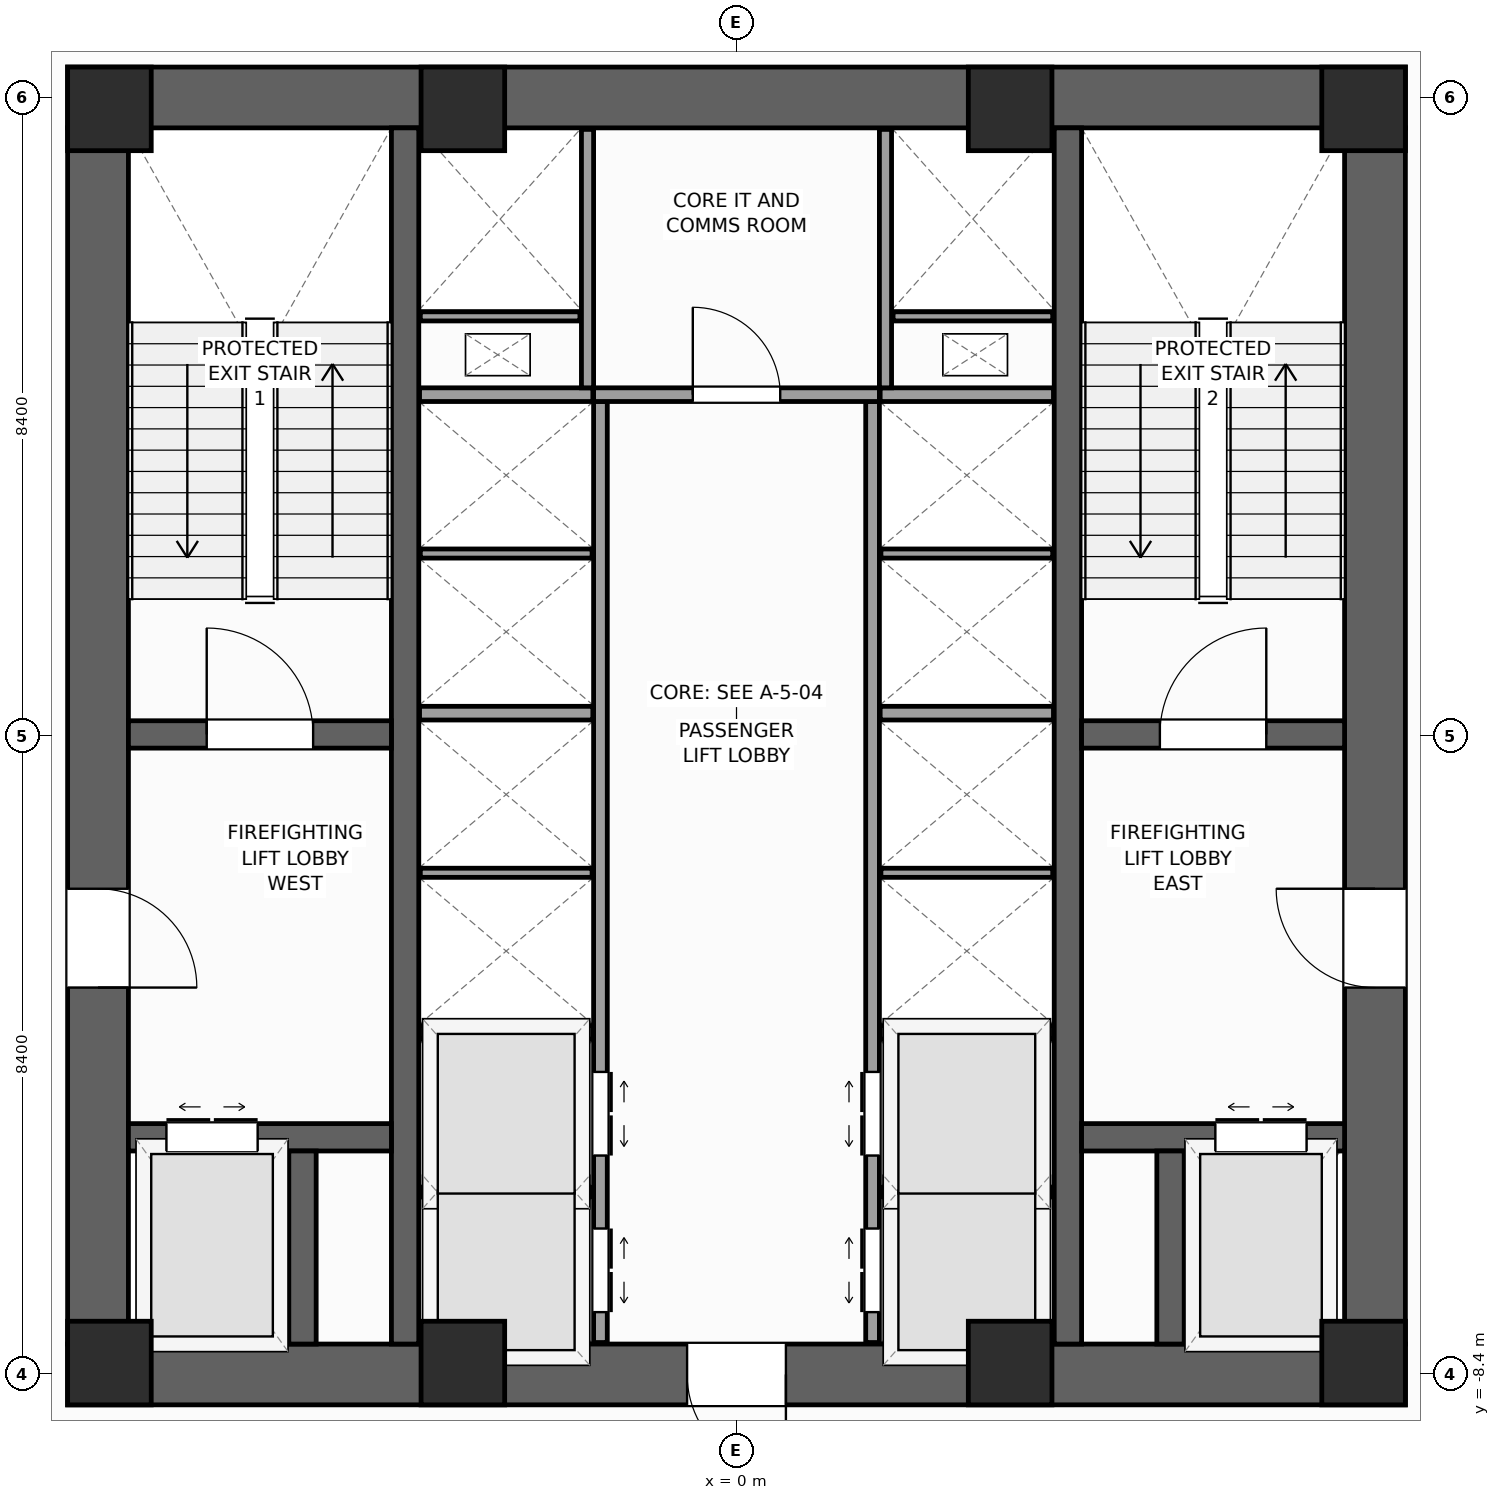
"""IFC4 building model, lengths in metres.
Left out: names, types, materials, properties, quantities, classifications, styles, units other than length and angle.
Written with IfcOpenShell. Run it as: python <this file> out.ifc"""

import sys

from ifc_helpers import new_model, si_unit, direction, frame, frame_2d, origin, origin_2d, place, context, subcontext, project, spatial, rectangle, extrude, source, transform, mapped, element, fill, save


model = new_model("IFC4")
c1 = context("Model", 3, precision=1e-05, world=origin(), true_north=direction((0.0, 1.0)))
c2 = subcontext(c1, "Body", "Model", "MODEL_VIEW")
j1 = project(units=[si_unit("LENGTHUNIT", "METRE"), si_unit("PLANEANGLEUNIT", "RADIAN")], contexts=[c1])
p1 = place(None, origin())
s1 = spatial("IfcSite", under=j1, at=p1, CompositionType="ELEMENT")
p2 = place(p1, origin())
s2 = spatial("IfcBuilding", under=s1, at=p2, CompositionType="ELEMENT")
p3 = place(p2, frame((0.0, 0.0, 21.0)))
s3 = spatial("IfcBuildingStorey", under=s2, at=p3, CompositionType="ELEMENT", Elevation=21.0)
p4 = place(p3, frame((-8.8, -8.4, 0.0), z_axis=(0.0, 0.0, 1.0), x_axis=(1.0, 0.0, 0.0)))
e1 = element("IfcWall", 1, at=p4, inside=s3, PredefinedType="SHEAR", context=c2, shape_type="SweptSolid", body=[
    extrude(rectangle(XDim=17.6, YDim=0.8, at=frame_2d((8.8, 0.0))), origin(), (0.0, 0.0, 1.0), 5.0),
])
p5 = place(p4, frame((8.15, 0.0, 0.0)))
e2 = element("IfcOpeningElement", 2, at=p5, cuts=e1, PredefinedType="OPENING", context=c2, shape_type="SweptSolid", body=[
    extrude(rectangle(XDim=1.3, YDim=2.2, at=frame_2d((0.65, 1.1))), frame((0.0, 0.41, 0.0), z_axis=(0.0, -1.0, 0.0), x_axis=(1.0, 0.0, 0.0)), (0.0, 0.0, 1.0), 0.82),
])
p6 = place(p3, frame((-8.8, 8.4, 0.0), z_axis=(0.0, 0.0, 1.0), x_axis=(1.0, 0.0, 0.0)))
e3 = element("IfcWall", 3, at=p6, inside=s3, PredefinedType="SHEAR", context=c2, shape_type="SweptSolid", body=[
    extrude(rectangle(XDim=17.6, YDim=0.8, at=frame_2d((8.8, 0.0))), origin(), (0.0, 0.0, 1.0), 5.0),
])
p7 = place(p3, frame((-8.4, -8.0, 0.0), z_axis=(0.0, 0.0, 1.0), x_axis=(0.0, 1.0, 0.0)))
e4 = element("IfcWall", 4, at=p7, inside=s3, PredefinedType="SHEAR", context=c2, shape_type="SweptSolid", body=[
    extrude(rectangle(XDim=16.0, YDim=0.8, at=frame_2d((8.0, 0.0))), origin(), (0.0, 0.0, 1.0), 5.0),
])
p8 = place(p7, frame((4.69, 0.0, 0.0)))
e5 = element("IfcOpeningElement", 5, at=p8, cuts=e4, PredefinedType="OPENING", context=c2, shape_type="SweptSolid", body=[
    extrude(rectangle(XDim=1.3, YDim=2.2, at=frame_2d((0.65, 1.1))), frame((0.0, 0.41, 0.0), z_axis=(0.0, -1.0, 0.0), x_axis=(1.0, 0.0, 0.0)), (0.0, 0.0, 1.0), 0.82),
])
p9 = place(p3, frame((8.4, -8.0, 0.0), z_axis=(0.0, 0.0, 1.0), x_axis=(0.0, 1.0, 0.0)))
e6 = element("IfcWall", 6, at=p9, inside=s3, PredefinedType="SHEAR", context=c2, shape_type="SweptSolid", body=[
    extrude(rectangle(XDim=16.0, YDim=0.8, at=frame_2d((8.0, 0.0))), origin(), (0.0, 0.0, 1.0), 5.0),
])
p10 = place(p9, frame((4.69, 0.0, 0.0)))
e7 = element("IfcOpeningElement", 7, at=p10, cuts=e6, PredefinedType="OPENING", context=c2, shape_type="SweptSolid", body=[
    extrude(rectangle(XDim=1.3, YDim=2.2, at=frame_2d((0.65, 1.1))), frame((0.0, 0.41, 0.0), z_axis=(0.0, -1.0, 0.0), x_axis=(1.0, 0.0, 0.0)), (0.0, 0.0, 1.0), 0.82),
])
for number, where, z_axis, x_axis in (
    (8, (-4.36, -8.0, 0.0), (0.0, 0.0, 1.0), (0.0, 1.0, 0.0)),
    (9, (4.36, -8.0, 0.0), (0.0, 0.0, 1.0), (0.0, 1.0, 0.0)),
):
    element("IfcWall", number, at=place(p3, frame(where, z_axis=z_axis, x_axis=x_axis)), inside=s3, PredefinedType="SHEAR", context=c2, shape_type="SweptSolid", body=[
        extrude(rectangle(XDim=16.0, YDim=0.36, at=frame_2d((8.0, 0.0))), origin(), (0.0, 0.0, 1.0), 5.0),
    ])
p11 = place(p3, frame((-8.0, 0.02, 0.0), z_axis=(0.0, 0.0, 1.0), x_axis=(1.0, 0.0, 0.0)))
e10 = element("IfcWall", 10, at=p11, inside=s3, PredefinedType="SHEAR", context=c2, shape_type="SweptSolid", body=[
    extrude(rectangle(XDim=3.46, YDim=0.36, at=frame_2d((1.73, 0.0))), origin(), (0.0, 0.0, 1.0), 5.0),
])
p12 = place(p11, frame((1.03, 0.0, 0.0)))
e11 = element("IfcOpeningElement", 11, at=p12, cuts=e10, PredefinedType="OPENING", context=c2, shape_type="SweptSolid", body=[
    extrude(rectangle(XDim=1.4, YDim=2.2, at=frame_2d((0.7, 1.1))), frame((0.0, 0.19, 0.0), z_axis=(0.0, -1.0, 0.0), x_axis=(1.0, 0.0, 0.0)), (0.0, 0.0, 1.0), 0.38),
])
p13 = place(p3, frame((4.54, 0.02, 0.0), z_axis=(0.0, 0.0, 1.0), x_axis=(1.0, 0.0, 0.0)))
e12 = element("IfcWall", 12, at=p13, inside=s3, PredefinedType="SHEAR", context=c2, shape_type="SweptSolid", body=[
    extrude(rectangle(XDim=3.46, YDim=0.36, at=frame_2d((1.73, 0.0))), origin(), (0.0, 0.0, 1.0), 5.0),
])
p14 = place(p13, frame((1.03, 0.0, 0.0)))
e13 = element("IfcOpeningElement", 13, at=p14, cuts=e12, PredefinedType="OPENING", context=c2, shape_type="SweptSolid", body=[
    extrude(rectangle(XDim=1.4, YDim=2.2, at=frame_2d((0.7, 1.1))), frame((0.0, 0.19, 0.0), z_axis=(0.0, -1.0, 0.0), x_axis=(1.0, 0.0, 0.0)), (0.0, 0.0, 1.0), 0.38),
])
p15 = place(p3, frame((-8.0, -5.28, 0.0), z_axis=(0.0, 0.0, 1.0), x_axis=(1.0, 0.0, 0.0)))
e14 = element("IfcWall", 14, at=p15, inside=s3, PredefinedType="SHEAR", context=c2, shape_type="SweptSolid", body=[
    extrude(rectangle(XDim=3.46, YDim=0.36, at=frame_2d((1.73, 0.0))), origin(), (0.0, 0.0, 1.0), 5.0),
])
p16 = place(p15, frame((0.5, 0.0, 0.0)))
e15 = element("IfcOpeningElement", 15, at=p16, cuts=e14, PredefinedType="OPENING", context=c2, shape_type="SweptSolid", body=[
    extrude(rectangle(XDim=1.2, YDim=2.25, at=frame_2d((0.6, 1.125))), frame((0.0, 0.19, 0.0), z_axis=(0.0, -1.0, 0.0), x_axis=(1.0, 0.0, 0.0)), (0.0, 0.0, 1.0), 0.38),
])
p17 = place(p3, frame((4.54, -5.28, 0.0), z_axis=(0.0, 0.0, 1.0), x_axis=(1.0, 0.0, 0.0)))
e16 = element("IfcWall", 16, at=p17, inside=s3, PredefinedType="SHEAR", context=c2, shape_type="SweptSolid", body=[
    extrude(rectangle(XDim=3.46, YDim=0.36, at=frame_2d((1.73, 0.0))), origin(), (0.0, 0.0, 1.0), 5.0),
])
p18 = place(p17, frame((1.76, 0.0, 0.0)))
e17 = element("IfcOpeningElement", 17, at=p18, cuts=e16, PredefinedType="OPENING", context=c2, shape_type="SweptSolid", body=[
    extrude(rectangle(XDim=1.2, YDim=2.25, at=frame_2d((0.6, 1.125))), frame((0.0, 0.19, 0.0), z_axis=(0.0, -1.0, 0.0), x_axis=(1.0, 0.0, 0.0)), (0.0, 0.0, 1.0), 0.38),
])
for number, where, z_axis, x_axis in (
    (18, (-5.71, -8.0, 0.0), (0.0, 0.0, 1.0), (0.0, 1.0, 0.0)),
    (19, (5.71, -8.0, 0.0), (0.0, 0.0, 1.0), (0.0, 1.0, 0.0)),
):
    element("IfcWall", number, at=place(p3, frame(where, z_axis=z_axis, x_axis=x_axis)), inside=s3, PredefinedType="SHEAR", context=c2, shape_type="SweptSolid", body=[
        extrude(rectangle(XDim=2.54, YDim=0.36, at=frame_2d((1.27, 0.0))), origin(), (0.0, 0.0, 1.0), 5.0),
    ])
m1 = source(origin(), c2, "Body", "SweptSolid", [
    extrude(rectangle(XDim=1.1, YDim=1.1, at=origin_2d()), origin(), (0.0, 0.0, 1.0), 5.0),
])
for number, where, z_axis, x_axis in (
    (20, (-8.25, -8.25, 0.0), (0.0, 0.0, 1.0), (1.0, 0.0, 0.0)),
    (21, (8.25, -8.25, 0.0), (0.0, 0.0, 1.0), (1.0, 0.0, 0.0)),
    (22, (8.25, 8.25, 0.0), (0.0, 0.0, 1.0), (1.0, 0.0, 0.0)),
    (23, (-8.25, 8.25, 0.0), (0.0, 0.0, 1.0), (1.0, 0.0, 0.0)),
    (24, (-3.6, -8.25, 0.0), (0.0, 0.0, 1.0), (1.0, 0.0, 0.0)),
    (25, (3.6, -8.25, 0.0), (0.0, 0.0, 1.0), (1.0, 0.0, 0.0)),
    (26, (-3.6, 8.25, 0.0), (0.0, 0.0, 1.0), (1.0, 0.0, 0.0)),
    (27, (3.6, 8.25, 0.0), (0.0, 0.0, 1.0), (1.0, 0.0, 0.0)),
):
    element("IfcColumn", number, at=place(p3, frame(where, z_axis=z_axis, x_axis=x_axis)), inside=s3, PredefinedType="PILASTER", context=c2, shape_type="MappedRepresentation", body=[
        mapped(m1, transform((0.0, 0.0, 0.0), scale=1.0)),
    ])
p19 = place(p3, frame((-1.79, -7.98, 0.0), z_axis=(0.0, 0.0, 1.0), x_axis=(0.0, 1.0, 0.0)))
e28 = element("IfcWall", 28, at=p19, inside=s3, PredefinedType="PARTITIONING", context=c2, shape_type="SweptSolid", body=[
    extrude(rectangle(XDim=12.38, YDim=0.18, at=frame_2d((6.19, 0.0))), origin(), (0.0, 0.0, 1.0), 4.72),
])
p20 = place(p19, frame((0.4, 0.0, 0.0)))
e29 = element("IfcOpeningElement", 29, at=p20, cuts=e28, PredefinedType="OPENING", context=c2, shape_type="SweptSolid", body=[
    extrude(rectangle(XDim=1.1, YDim=2.2, at=frame_2d((0.55, 1.1))), frame((0.0, 0.1, 0.0), z_axis=(0.0, -1.0, 0.0), x_axis=(1.0, 0.0, 0.0)), (0.0, 0.0, 1.0), 0.2),
])
p21 = place(p19, frame((2.46, 0.0, 0.0)))
e30 = element("IfcOpeningElement", 30, at=p21, cuts=e28, PredefinedType="OPENING", context=c2, shape_type="SweptSolid", body=[
    extrude(rectangle(XDim=1.1, YDim=2.2, at=frame_2d((0.55, 1.1))), frame((0.0, 0.1, 0.0), z_axis=(0.0, -1.0, 0.0), x_axis=(1.0, 0.0, 0.0)), (0.0, 0.0, 1.0), 0.2),
])
p22 = place(p3, frame((1.79, -7.98, 0.0), z_axis=(0.0, 0.0, 1.0), x_axis=(0.0, 1.0, 0.0)))
e31 = element("IfcWall", 31, at=p22, inside=s3, PredefinedType="PARTITIONING", context=c2, shape_type="SweptSolid", body=[
    extrude(rectangle(XDim=12.38, YDim=0.18, at=frame_2d((6.19, 0.0))), origin(), (0.0, 0.0, 1.0), 4.72),
])
p23 = place(p22, frame((0.4, 0.0, 0.0)))
e32 = element("IfcOpeningElement", 32, at=p23, cuts=e31, PredefinedType="OPENING", context=c2, shape_type="SweptSolid", body=[
    extrude(rectangle(XDim=1.1, YDim=2.2, at=frame_2d((0.55, 1.1))), frame((0.0, 0.1, 0.0), z_axis=(0.0, -1.0, 0.0), x_axis=(1.0, 0.0, 0.0)), (0.0, 0.0, 1.0), 0.2),
])
p24 = place(p22, frame((2.46, 0.0, 0.0)))
e33 = element("IfcOpeningElement", 33, at=p24, cuts=e31, PredefinedType="OPENING", context=c2, shape_type="SweptSolid", body=[
    extrude(rectangle(XDim=1.1, YDim=2.2, at=frame_2d((0.55, 1.1))), frame((0.0, 0.1, 0.0), z_axis=(0.0, -1.0, 0.0), x_axis=(1.0, 0.0, 0.0)), (0.0, 0.0, 1.0), 0.2),
])
p25 = place(p3, frame((-1.88, 4.49, 0.0), z_axis=(0.0, 0.0, 1.0), x_axis=(1.0, 0.0, 0.0)))
e34 = element("IfcWall", 34, at=p25, inside=s3, PredefinedType="PARTITIONING", context=c2, shape_type="SweptSolid", body=[
    extrude(rectangle(XDim=3.76, YDim=0.18, at=frame_2d((1.88, 0.0))), origin(), (0.0, 0.0, 1.0), 4.72),
])
p26 = place(p25, frame((1.305, 0.0, 0.0)))
e35 = element("IfcOpeningElement", 35, at=p26, cuts=e34, PredefinedType="OPENING", context=c2, shape_type="SweptSolid", body=[
    extrude(rectangle(XDim=1.15, YDim=2.25, at=frame_2d((0.575, 1.125))), frame((0.0, 0.1, 0.0), z_axis=(0.0, -1.0, 0.0), x_axis=(1.0, 0.0, 0.0)), (0.0, 0.0, 1.0), 0.2),
])
for number, where, z_axis, x_axis in (
    (36, (-4.17, -3.9, 0.0), (0.0, 0.0, 1.0), (1.0, 0.0, 0.0)),
    (37, (1.89, -3.9, 0.0), (0.0, 0.0, 1.0), (1.0, 0.0, 0.0)),
    (38, (-4.17, 0.3, 0.0), (0.0, 0.0, 1.0), (1.0, 0.0, 0.0)),
    (39, (1.89, 0.3, 0.0), (0.0, 0.0, 1.0), (1.0, 0.0, 0.0)),
    (40, (-4.17, 4.49, 0.0), (0.0, 0.0, 1.0), (1.0, 0.0, 0.0)),
    (41, (1.89, 4.49, 0.0), (0.0, 0.0, 1.0), (1.0, 0.0, 0.0)),
):
    element("IfcWall", number, at=place(p3, frame(where, z_axis=z_axis, x_axis=x_axis)), inside=s3, PredefinedType="PARTITIONING", context=c2, shape_type="SweptSolid", body=[
        extrude(rectangle(XDim=2.28, YDim=0.18, at=frame_2d((1.14, 0.0))), origin(), (0.0, 0.0, 1.0), 4.72),
    ])
for number, where, z_axis, x_axis in (
    (42, (-4.16, -6.0, 0.0), (0.0, 0.0, 1.0), (1.0, 0.0, 0.0)),
    (43, (1.9, -6.0, 0.0), (0.0, 0.0, 1.0), (1.0, 0.0, 0.0)),
    (44, (-4.16, -1.8, 0.0), (0.0, 0.0, 1.0), (1.0, 0.0, 0.0)),
    (45, (1.9, -1.8, 0.0), (0.0, 0.0, 1.0), (1.0, 0.0, 0.0)),
    (46, (-4.16, 2.4, 0.0), (0.0, 0.0, 1.0), (1.0, 0.0, 0.0)),
    (47, (1.9, 2.4, 0.0), (0.0, 0.0, 1.0), (1.0, 0.0, 0.0)),
):
    element("IfcWall", number, at=place(p3, frame(where, z_axis=z_axis, x_axis=x_axis)), inside=s3, PredefinedType="PARTITIONING", context=c2, shape_type="SweptSolid", body=[
        extrude(rectangle(XDim=2.26, YDim=0.12, at=frame_2d((1.13, 0.0))), origin(), (0.0, 0.0, 1.0), 4.72),
    ])
for number, where, z_axis, x_axis in (
    (48, (-1.96, 4.58, 0.0), (0.0, 0.0, 1.0), (0.0, 1.0, 0.0)),
    (49, (1.96, 4.58, 0.0), (0.0, 0.0, 1.0), (0.0, 1.0, 0.0)),
):
    element("IfcWall", number, at=place(p3, frame(where, z_axis=z_axis, x_axis=x_axis)), inside=s3, PredefinedType="PARTITIONING", context=c2, shape_type="SweptSolid", body=[
        extrude(rectangle(XDim=3.4, YDim=0.16, at=frame_2d((1.7, 0.0))), origin(), (0.0, 0.0, 1.0), 4.72),
    ])
for number, where, z_axis, x_axis in (
    (50, (-4.16, 5.52, 0.0), (0.0, 0.0, 1.0), (1.0, 0.0, 0.0)),
    (51, (2.06, 5.52, 0.0), (0.0, 0.0, 1.0), (1.0, 0.0, 0.0)),
):
    element("IfcWall", number, at=place(p3, frame(where, z_axis=z_axis, x_axis=x_axis)), inside=s3, PredefinedType="PARTITIONING", context=c2, shape_type="SweptSolid", body=[
        extrude(rectangle(XDim=2.1, YDim=0.12, at=frame_2d((1.05, 0.0))), origin(), (0.0, 0.0, 1.0), 4.72),
    ])
m2 = source(origin(), c2, "Body", "SweptSolid", [
    extrude(rectangle(XDim=1.4, YDim=2.2, at=frame_2d((0.7, 1.1))), frame((0.0, 0.025, 0.0), z_axis=(0.0, -1.0, 0.0), x_axis=(1.0, 0.0, 0.0)), (0.0, 0.0, 1.0), 0.05),
])
p27 = place(p12, origin())
e52 = element("IfcDoor", 52, at=p27, inside=s3, OperationType="SINGLE_SWING_LEFT", PredefinedType="DOOR", context=c2, shape_type="MappedRepresentation", body=[
    mapped(m2, transform((0.0, 0.0, 0.0), scale=1.0)),
])
fill(e11, e52)
p28 = place(p14, origin())
e53 = element("IfcDoor", 53, at=p28, inside=s3, OperationType="SINGLE_SWING_RIGHT", PredefinedType="DOOR", context=c2, shape_type="MappedRepresentation", body=[
    mapped(m2, transform((0.0, 0.0, 0.0), scale=1.0)),
])
fill(e13, e53)
m3 = source(origin(), c2, "Body", "SweptSolid", [
    extrude(rectangle(XDim=1.3, YDim=2.2, at=frame_2d((0.65, 1.1))), frame((0.0, 0.025, 0.0), z_axis=(0.0, -1.0, 0.0), x_axis=(1.0, 0.0, 0.0)), (0.0, 0.0, 1.0), 0.05),
])
p29 = place(p8, frame((1.3, 0.0, 0.0), z_axis=(0.0, 0.0, 1.0), x_axis=(-1.0, 0.0, 0.0)))
e54 = element("IfcDoor", 54, at=p29, inside=s3, OperationType="SINGLE_SWING_LEFT", PredefinedType="DOOR", context=c2, shape_type="MappedRepresentation", body=[
    mapped(m3, transform((0.0, 0.0, 0.0), scale=1.0)),
])
fill(e5, e54)
p30 = place(p10, origin())
e55 = element("IfcDoor", 55, at=p30, inside=s3, OperationType="SINGLE_SWING_RIGHT", PredefinedType="DOOR", context=c2, shape_type="MappedRepresentation", body=[
    mapped(m3, transform((0.0, 0.0, 0.0), scale=1.0)),
])
fill(e7, e55)
p31 = place(p5, frame((1.3, 0.0, 0.0), z_axis=(0.0, 0.0, 1.0), x_axis=(-1.0, 0.0, 0.0)))
e56 = element("IfcDoor", 56, at=p31, inside=s3, OperationType="SINGLE_SWING_RIGHT", PredefinedType="DOOR", context=c2, shape_type="MappedRepresentation", body=[
    mapped(m3, transform((0.0, 0.0, 0.0), scale=1.0)),
])
fill(e2, e56)
m4 = source(origin(), c2, "Body", "SweptSolid", [
    extrude(rectangle(XDim=1.2, YDim=2.25, at=frame_2d((0.6, 1.125))), frame((0.0, 0.025, 0.0), z_axis=(0.0, -1.0, 0.0), x_axis=(1.0, 0.0, 0.0)), (0.0, 0.0, 1.0), 0.05),
])
p32 = place(p16, origin())
e57 = element("IfcDoor", 57, at=p32, inside=s3, OperationType="DOUBLE_DOOR_SLIDING", PredefinedType="DOOR", context=c2, shape_type="MappedRepresentation", body=[
    mapped(m4, transform((0.0, 0.0, 0.0), scale=1.0)),
])
fill(e15, e57)
p33 = place(p18, origin())
e58 = element("IfcDoor", 58, at=p33, inside=s3, OperationType="DOUBLE_DOOR_SLIDING", PredefinedType="DOOR", context=c2, shape_type="MappedRepresentation", body=[
    mapped(m4, transform((0.0, 0.0, 0.0), scale=1.0)),
])
fill(e17, e58)
m5 = source(origin(), c2, "Body", "SweptSolid", [
    extrude(rectangle(XDim=1.1, YDim=2.2, at=frame_2d((0.55, 1.1))), frame((0.0, 0.025, 0.0), z_axis=(0.0, -1.0, 0.0), x_axis=(1.0, 0.0, 0.0)), (0.0, 0.0, 1.0), 0.05),
])
p34 = place(p20, frame((1.1, 0.0, 0.0), z_axis=(0.0, 0.0, 1.0), x_axis=(-1.0, 0.0, 0.0)))
e59 = element("IfcDoor", 59, at=p34, inside=s3, OperationType="DOUBLE_DOOR_SLIDING", PredefinedType="DOOR", context=c2, shape_type="MappedRepresentation", body=[
    mapped(m5, transform((0.0, 0.0, 0.0), scale=1.0)),
])
fill(e29, e59)
p35 = place(p21, frame((1.1, 0.0, 0.0), z_axis=(0.0, 0.0, 1.0), x_axis=(-1.0, 0.0, 0.0)))
e60 = element("IfcDoor", 60, at=p35, inside=s3, OperationType="DOUBLE_DOOR_SLIDING", PredefinedType="DOOR", context=c2, shape_type="MappedRepresentation", body=[
    mapped(m5, transform((0.0, 0.0, 0.0), scale=1.0)),
])
fill(e30, e60)
p36 = place(p23, origin())
e61 = element("IfcDoor", 61, at=p36, inside=s3, OperationType="DOUBLE_DOOR_SLIDING", PredefinedType="DOOR", context=c2, shape_type="MappedRepresentation", body=[
    mapped(m5, transform((0.0, 0.0, 0.0), scale=1.0)),
])
fill(e32, e61)
p37 = place(p24, origin())
e62 = element("IfcDoor", 62, at=p37, inside=s3, OperationType="DOUBLE_DOOR_SLIDING", PredefinedType="DOOR", context=c2, shape_type="MappedRepresentation", body=[
    mapped(m5, transform((0.0, 0.0, 0.0), scale=1.0)),
])
fill(e33, e62)
m6 = source(origin(), c2, "Body", "SweptSolid", [
    extrude(rectangle(XDim=1.15, YDim=2.25, at=frame_2d((0.575, 1.125))), frame((0.0, 0.025, 0.0), z_axis=(0.0, -1.0, 0.0), x_axis=(1.0, 0.0, 0.0)), (0.0, 0.0, 1.0), 0.05),
])
p38 = place(p26, origin())
e63 = element("IfcDoor", 63, at=p38, inside=s3, OperationType="SINGLE_SWING_LEFT", PredefinedType="DOOR", context=c2, shape_type="MappedRepresentation", body=[
    mapped(m6, transform((0.0, 0.0, 0.0), scale=1.0)),
])
fill(e35, e63)
save(model, sys.argv[1])
